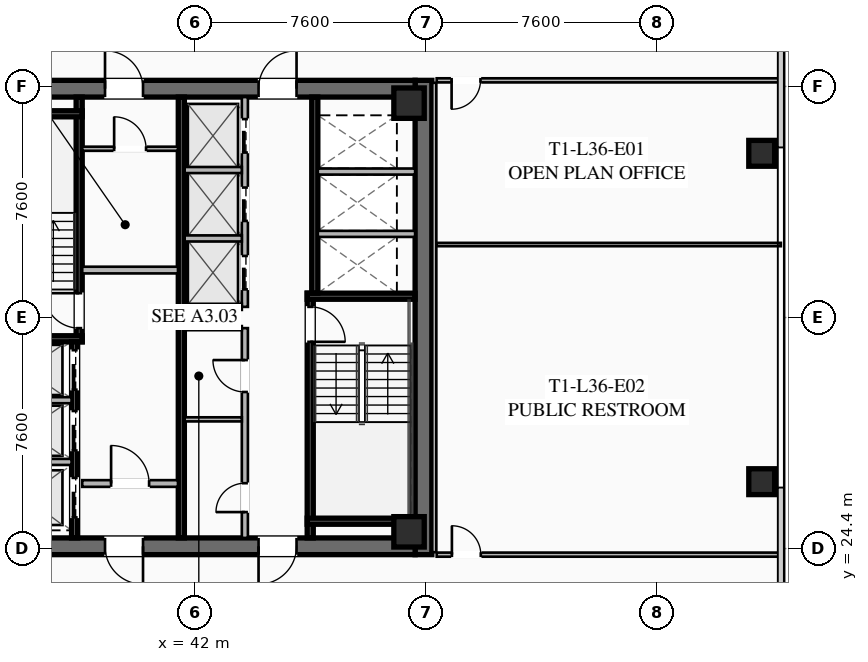
"""IFC4 building model, lengths in metres.
Left out: names, types, materials, properties, quantities, classifications, styles, units other than length and angle.
Written with IfcOpenShell. Run it as: python <this file> out.ifc"""

import sys

from ifc_helpers import new_model, si_unit, direction, frame, frame_2d, origin, origin_2d, place, context, subcontext, project, spatial, rectangle, hollow_rectangle, extrude, element, fill, save


model = new_model("IFC4")
c1 = context("Model", 3, precision=1e-05, world=origin(), true_north=direction((0.0, 1.0)))
c2 = subcontext(c1, "Body", "Model", "MODEL_VIEW")
j1 = project(units=[si_unit("LENGTHUNIT", "METRE"), si_unit("PLANEANGLEUNIT", "RADIAN")], contexts=[c1])
p1 = place(None, origin())
s1 = spatial("IfcSite", under=j1, at=p1, CompositionType="ELEMENT")
p2 = place(p1, origin())
s2 = spatial("IfcBuilding", under=s1, at=p2, CompositionType="ELEMENT")
p3 = place(p2, frame((0.0, 0.0, 135.7)))
s3 = spatial("IfcBuildingStorey", under=s2, at=p3, CompositionType="ELEMENT", Elevation=135.7)
p4 = place(p3, frame((49.525, 39.8, 0.0), z_axis=(0.0, 0.0, 1.0), x_axis=(0.0, -1.0, 0.0)))
e1 = element("IfcWall", 1, at=p4, inside=s3, PredefinedType="SHEAR", context=c2, shape_type="SweptSolid", body=[
    extrude(rectangle(XDim=15.6, YDim=0.55, at=frame_2d((7.8, 0.0))), origin(), (0.0, 0.0, 1.0), 3.55),
])
p5 = place(p3, frame((49.25, 24.475, 0.0), z_axis=(0.0, 0.0, 1.0), x_axis=(-1.0, 0.0, 0.0)))
e2 = element("IfcWall", 2, at=p5, inside=s3, PredefinedType="SHEAR", context=c2, shape_type="SweptSolid", body=[
    extrude(rectangle(XDim=14.5, YDim=0.55, at=frame_2d((7.25, 0.0))), origin(), (0.0, 0.0, 1.0), 3.55),
])
p6 = place(p5, frame((8.95, 0.0, 0.0)))
e3 = element("IfcOpeningElement", 3, at=p6, cuts=e2, PredefinedType="OPENING", context=c2, shape_type="SweptSolid", body=[
    extrude(rectangle(XDim=1.25, YDim=2.25, at=frame_2d((0.625, 1.125))), frame((0.0, 0.285, 0.0), z_axis=(0.0, -1.0, 0.0), x_axis=(1.0, 0.0, 0.0)), (0.0, 0.0, 1.0), 0.57),
])
p7 = place(p5, frame((3.9, 0.0, 0.0)))
e4 = element("IfcOpeningElement", 4, at=p7, cuts=e2, PredefinedType="OPENING", context=c2, shape_type="SweptSolid", body=[
    extrude(rectangle(XDim=1.25, YDim=2.25, at=frame_2d((0.625, 1.125))), frame((0.0, 0.285, 0.0), z_axis=(0.0, -1.0, 0.0), x_axis=(1.0, 0.0, 0.0)), (0.0, 0.0, 1.0), 0.57),
])
p8 = place(p3, frame((34.75, 39.525, 0.0), z_axis=(0.0, 0.0, 1.0), x_axis=(1.0, 0.0, 0.0)))
e5 = element("IfcWall", 5, at=p8, inside=s3, PredefinedType="SHEAR", context=c2, shape_type="SweptSolid", body=[
    extrude(rectangle(XDim=14.5, YDim=0.55, at=frame_2d((7.25, 0.0))), origin(), (0.0, 0.0, 1.0), 3.55),
])
p9 = place(p8, frame((4.3, 0.0, 0.0)))
e6 = element("IfcOpeningElement", 6, at=p9, cuts=e5, PredefinedType="OPENING", context=c2, shape_type="SweptSolid", body=[
    extrude(rectangle(XDim=1.25, YDim=2.25, at=frame_2d((0.625, 1.125))), frame((0.0, 0.285, 0.0), z_axis=(0.0, -1.0, 0.0), x_axis=(1.0, 0.0, 0.0)), (0.0, 0.0, 1.0), 0.57),
])
p10 = place(p8, frame((9.35, 0.0, 0.0)))
e7 = element("IfcOpeningElement", 7, at=p10, cuts=e5, PredefinedType="OPENING", context=c2, shape_type="SweptSolid", body=[
    extrude(rectangle(XDim=1.25, YDim=2.25, at=frame_2d((0.625, 1.125))), frame((0.0, 0.285, 0.0), z_axis=(0.0, -1.0, 0.0), x_axis=(1.0, 0.0, 0.0)), (0.0, 0.0, 1.0), 0.57),
])
for number, where, z_axis, x_axis in (
    (8, (49.05, 24.95, 0.0), (0.0, 0.0, 1.0), (1.0, 0.0, 0.0)),
    (9, (49.05, 39.05, 0.0), (0.0, 0.0, 1.0), (1.0, 0.0, 0.0)),
):
    element("IfcColumn", number, at=place(p3, frame(where, z_axis=z_axis, x_axis=x_axis)), inside=s3, PredefinedType="COLUMN", context=c2, shape_type="SweptSolid", body=[
        extrude(hollow_rectangle(XDim=1.0, YDim=1.0, WallThickness=0.04, at=origin_2d()), origin(), (0.0, 0.0, 1.0), 3.37),
    ])
for number, where, z_axis, x_axis in (
    (10, (60.65, 26.6, 0.0), (0.0, 0.0, 1.0), (1.0, 0.0, 0.0)),
    (11, (60.65, 37.4, 0.0), (0.0, 0.0, 1.0), (1.0, 0.0, 0.0)),
):
    element("IfcColumn", number, at=place(p3, frame(where, z_axis=z_axis, x_axis=x_axis)), inside=s3, PredefinedType="COLUMN", context=c2, shape_type="SweptSolid", body=[
        extrude(hollow_rectangle(XDim=0.85, YDim=0.85, WallThickness=0.035, at=origin_2d()), origin(), (0.0, 0.0, 1.0), 3.37),
    ])
p11 = place(p3, frame((38.2, 31.2, 0.0), z_axis=(0.0, 0.0, 1.0), x_axis=(0.0, 1.0, 0.0)))
e12 = element("IfcWall", 12, at=p11, inside=s3, PredefinedType="SHEAR", context=c2, shape_type="SweptSolid", body=[
    extrude(rectangle(XDim=8.05, YDim=0.2, at=frame_2d((4.025, 0.0))), origin(), (0.0, 0.0, 1.0), 3.37),
])
p12 = place(p11, frame((0.45, 0.0, 0.0)))
e13 = element("IfcOpeningElement", 13, at=p12, cuts=e12, PredefinedType="OPENING", context=c2, shape_type="SweptSolid", body=[
    extrude(rectangle(XDim=1.15, YDim=2.2, at=frame_2d((0.575, 1.1))), frame((0.0, 0.11, 0.0), z_axis=(0.0, -1.0, 0.0), x_axis=(1.0, 0.0, 0.0)), (0.0, 0.0, 1.0), 0.22),
])
for number, where, z_axis, x_axis in (
    (14, (34.75, 31.3, 0.0), (0.0, 0.0, 1.0), (1.0, 0.0, 0.0)),
    (15, (34.75, 38.7, 0.0), (0.0, 0.0, 1.0), (1.0, 0.0, 0.0)),
):
    element("IfcWall", number, at=place(p3, frame(where, z_axis=z_axis, x_axis=x_axis)), inside=s3, PredefinedType="SHEAR", context=c2, shape_type="SweptSolid", body=[
        extrude(rectangle(XDim=3.55, YDim=0.2, at=frame_2d((1.775, 0.0))), origin(), (0.0, 0.0, 1.0), 3.37),
    ])
p13 = place(p3, frame((45.8, 32.8, 0.0), z_axis=(0.0, 0.0, 1.0), x_axis=(0.0, -1.0, 0.0)))
e16 = element("IfcWall", 16, at=p13, inside=s3, PredefinedType="SHEAR", context=c2, shape_type="SweptSolid", body=[
    extrude(rectangle(XDim=8.05, YDim=0.2, at=frame_2d((4.025, 0.0))), origin(), (0.0, 0.0, 1.0), 3.37),
])
p14 = place(p13, frame((0.45, 0.0, 0.0)))
e17 = element("IfcOpeningElement", 17, at=p14, cuts=e16, PredefinedType="OPENING", context=c2, shape_type="SweptSolid", body=[
    extrude(rectangle(XDim=1.15, YDim=2.2, at=frame_2d((0.575, 1.1))), frame((0.0, 0.11, 0.0), z_axis=(0.0, -1.0, 0.0), x_axis=(1.0, 0.0, 0.0)), (0.0, 0.0, 1.0), 0.22),
])
for number, where, z_axis, x_axis in (
    (18, (45.7, 32.7, 0.0), (0.0, 0.0, 1.0), (1.0, 0.0, 0.0)),
    (19, (45.7, 25.3, 0.0), (0.0, 0.0, 1.0), (1.0, 0.0, 0.0)),
):
    element("IfcWall", number, at=place(p3, frame(where, z_axis=z_axis, x_axis=x_axis)), inside=s3, PredefinedType="SHEAR", context=c2, shape_type="SweptSolid", body=[
        extrude(rectangle(XDim=3.55, YDim=0.2, at=frame_2d((1.775, 0.0))), origin(), (0.0, 0.0, 1.0), 3.37),
    ])
p15 = place(p3, frame((41.56, 24.75, 0.0), z_axis=(0.0, 0.0, 1.0), x_axis=(0.0, 1.0, 0.0)))
e20 = element("IfcWall", 20, at=p15, inside=s3, PredefinedType="SHEAR", context=c2, shape_type="SweptSolid", body=[
    extrude(rectangle(XDim=14.5, YDim=0.2, at=frame_2d((7.25, 0.0))), origin(), (0.0, 0.0, 1.0), 3.37),
])
p16 = place(p3, frame((38.3, 33.56, 0.0), z_axis=(0.0, 0.0, 1.0), x_axis=(1.0, 0.0, 0.0)))
e21 = element("IfcWall", 21, at=p16, inside=s3, PredefinedType="SOLIDWALL", context=c2, shape_type="SweptSolid", body=[
    extrude(rectangle(XDim=3.15, YDim=0.22, at=frame_2d((1.575, 0.0))), origin(), (0.0, 0.0, 1.0), 2.723),
])
p17 = place(p3, frame((38.3, 26.54, 0.0), z_axis=(0.0, 0.0, 1.0), x_axis=(1.0, 0.0, 0.0)))
e22 = element("IfcWall", 22, at=p17, inside=s3, PredefinedType="SOLIDWALL", context=c2, shape_type="SweptSolid", body=[
    extrude(rectangle(XDim=3.15, YDim=0.22, at=frame_2d((1.575, 0.0))), origin(), (0.0, 0.0, 1.0), 2.723),
])
p18 = place(p17, frame((0.95, 0.0, 0.0)))
e23 = element("IfcOpeningElement", 23, at=p18, cuts=e22, PredefinedType="OPENING", context=c2, shape_type="SweptSolid", body=[
    extrude(rectangle(XDim=1.25, YDim=2.25, at=frame_2d((0.625, 1.125))), frame((0.0, 0.12, 0.0), z_axis=(0.0, -1.0, 0.0), x_axis=(1.0, 0.0, 0.0)), (0.0, 0.0, 1.0), 0.24),
])
p19 = place(p3, frame((38.05, 24.75, 0.0), z_axis=(0.0, 0.0, 1.0), x_axis=(0.0, 1.0, 0.0)))
e24 = element("IfcWall", 24, at=p19, inside=s3, PredefinedType="SHEAR", context=c2, shape_type="SweptSolid", body=[
    extrude(rectangle(XDim=6.45, YDim=0.2, at=frame_2d((3.225, 0.0))), origin(), (0.0, 0.0, 1.0), 3.37),
])
p20 = place(p19, frame((4.875, 0.0, 0.0)))
e25 = element("IfcOpeningElement", 25, at=p20, cuts=e24, PredefinedType="OPENING", context=c2, shape_type="SweptSolid", body=[
    extrude(rectangle(XDim=1.3, YDim=2.25, at=frame_2d((0.65, 1.125))), frame((0.0, 0.11, 0.0), z_axis=(0.0, -1.0, 0.0), x_axis=(1.0, 0.0, 0.0)), (0.0, 0.0, 1.0), 0.22),
])
p21 = place(p19, frame((2.875, 0.0, 0.0)))
e26 = element("IfcOpeningElement", 26, at=p21, cuts=e24, PredefinedType="OPENING", context=c2, shape_type="SweptSolid", body=[
    extrude(rectangle(XDim=1.3, YDim=2.25, at=frame_2d((0.65, 1.125))), frame((0.0, 0.11, 0.0), z_axis=(0.0, -1.0, 0.0), x_axis=(1.0, 0.0, 0.0)), (0.0, 0.0, 1.0), 0.22),
])
p22 = place(p19, frame((0.675, 0.0, 0.0)))
e27 = element("IfcOpeningElement", 27, at=p22, cuts=e24, PredefinedType="OPENING", context=c2, shape_type="SweptSolid", body=[
    extrude(rectangle(XDim=1.3, YDim=2.25, at=frame_2d((0.65, 1.125))), frame((0.0, 0.11, 0.0), z_axis=(0.0, -1.0, 0.0), x_axis=(1.0, 0.0, 0.0)), (0.0, 0.0, 1.0), 0.22),
])
for number, where, z_axis, x_axis in (
    (28, (34.75, 27.25, 0.0), (0.0, 0.0, 1.0), (1.0, 0.0, 0.0)),
    (29, (34.75, 29.28, 0.0), (0.0, 0.0, 1.0), (1.0, 0.0, 0.0)),
):
    element("IfcWall", number, at=place(p3, frame(where, z_axis=z_axis, x_axis=x_axis)), inside=s3, PredefinedType="SOLIDWALL", context=c2, shape_type="SweptSolid", body=[
        extrude(rectangle(XDim=3.2, YDim=0.2, at=frame_2d((1.6, 0.0))), origin(), (0.0, 0.0, 1.0), 3.37),
    ])
p23 = place(p3, frame((45.95, 39.25, 0.0), z_axis=(0.0, 0.0, 1.0), x_axis=(0.0, -1.0, 0.0)))
e30 = element("IfcWall", 30, at=p23, inside=s3, PredefinedType="SHEAR", context=c2, shape_type="SweptSolid", body=[
    extrude(rectangle(XDim=6.45, YDim=0.2, at=frame_2d((3.225, 0.0))), origin(), (0.0, 0.0, 1.0), 3.37),
])
for number, where, z_axis, x_axis in (
    (31, (46.05, 34.75, 0.0), (0.0, 0.0, 1.0), (1.0, 0.0, 0.0)),
    (32, (46.05, 36.8, 0.0), (0.0, 0.0, 1.0), (1.0, 0.0, 0.0)),
):
    element("IfcWall", number, at=place(p3, frame(where, z_axis=z_axis, x_axis=x_axis)), inside=s3, PredefinedType="SOLIDWALL", context=c2, shape_type="SweptSolid", body=[
        extrude(rectangle(XDim=3.2, YDim=0.2, at=frame_2d((1.6, 0.0))), origin(), (0.0, 0.0, 1.0), 3.37),
    ])
p24 = place(p3, frame((38.3, 37.55, 0.0), z_axis=(0.0, 0.0, 1.0), x_axis=(1.0, 0.0, 0.0)))
e33 = element("IfcWall", 33, at=p24, inside=s3, PredefinedType="PARTITIONING", context=c2, shape_type="SweptSolid", body=[
    extrude(rectangle(XDim=3.15, YDim=0.135, at=frame_2d((1.575, 0.0))), origin(), (0.0, 0.0, 1.0), 2.723),
])
p25 = place(p24, frame((1.05, 0.0, 0.0)))
e34 = element("IfcOpeningElement", 34, at=p25, cuts=e33, PredefinedType="OPENING", context=c2, shape_type="SweptSolid", body=[
    extrude(rectangle(XDim=1.05, YDim=2.2, at=frame_2d((0.525, 1.1))), frame((0.0, 0.077, 0.0), z_axis=(0.0, -1.0, 0.0), x_axis=(1.0, 0.0, 0.0)), (0.0, 0.0, 1.0), 0.155),
])
p26 = place(p3, frame((43.65, 24.75, 0.0), z_axis=(0.0, 0.0, 1.0), x_axis=(0.0, 1.0, 0.0)))
e35 = element("IfcWall", 35, at=p26, inside=s3, PredefinedType="SOLIDWALL", context=c2, shape_type="SweptSolid", body=[
    extrude(rectangle(XDim=6.9, YDim=0.2, at=frame_2d((3.45, 0.0))), origin(), (0.0, 0.0, 1.0), 2.723),
])
p27 = place(p26, frame((0.85, 0.0, 0.0)))
e36 = element("IfcOpeningElement", 36, at=p27, cuts=e35, PredefinedType="OPENING", context=c2, shape_type="SweptSolid", body=[
    extrude(rectangle(XDim=0.95, YDim=2.05, at=frame_2d((0.475, 1.025))), frame((0.0, 0.11, 0.0), z_axis=(0.0, -1.0, 0.0), x_axis=(1.0, 0.0, 0.0)), (0.0, 0.0, 1.0), 0.22),
])
p28 = place(p26, frame((4.8, 0.0, 0.0)))
e37 = element("IfcOpeningElement", 37, at=p28, cuts=e35, PredefinedType="OPENING", context=c2, shape_type="SweptSolid", body=[
    extrude(rectangle(XDim=1.05, YDim=2.2, at=frame_2d((0.525, 1.1))), frame((0.0, 0.11, 0.0), z_axis=(0.0, -1.0, 0.0), x_axis=(1.0, 0.0, 0.0)), (0.0, 0.0, 1.0), 0.22),
])
for number, where, z_axis, x_axis in (
    (38, (41.67, 31.65, 0.0), (0.0, 0.0, 1.0), (1.0, 0.0, 0.0)),
    (39, (41.67, 28.65, 0.0), (0.0, 0.0, 1.0), (1.0, 0.0, 0.0)),
):
    element("IfcWall", number, at=place(p3, frame(where, z_axis=z_axis, x_axis=x_axis)), inside=s3, PredefinedType="PARTITIONING", context=c2, shape_type="SweptSolid", body=[
        extrude(rectangle(XDim=1.88, YDim=0.135, at=frame_2d((0.94, 0.0))), origin(), (0.0, 0.0, 1.0), 2.723),
    ])
p29 = place(p3, frame((43.65, 32.35, 0.0), z_axis=(0.0, 0.0, 1.0), x_axis=(0.0, 1.0, 0.0)))
e40 = element("IfcWall", 40, at=p29, inside=s3, PredefinedType="SOLIDWALL", context=c2, shape_type="SweptSolid", body=[
    extrude(rectangle(XDim=6.9, YDim=0.2, at=frame_2d((3.45, 0.0))), origin(), (0.0, 0.0, 1.0), 3.37),
])
p30 = place(p29, frame((0.575, 0.0, 0.0)))
e41 = element("IfcOpeningElement", 41, at=p30, cuts=e40, PredefinedType="OPENING", context=c2, shape_type="SweptSolid", body=[
    extrude(rectangle(XDim=1.1, YDim=2.2, at=frame_2d((0.55, 1.1))), frame((0.0, 0.11, 0.0), z_axis=(0.0, -1.0, 0.0), x_axis=(1.0, 0.0, 0.0)), (0.0, 0.0, 1.0), 0.22),
])
p31 = place(p29, frame((2.825, 0.0, 0.0)))
e42 = element("IfcOpeningElement", 42, at=p31, cuts=e40, PredefinedType="OPENING", context=c2, shape_type="SweptSolid", body=[
    extrude(rectangle(XDim=1.1, YDim=2.2, at=frame_2d((0.55, 1.1))), frame((0.0, 0.11, 0.0), z_axis=(0.0, -1.0, 0.0), x_axis=(1.0, 0.0, 0.0)), (0.0, 0.0, 1.0), 0.22),
])
p32 = place(p29, frame((5.075, 0.0, 0.0)))
e43 = element("IfcOpeningElement", 43, at=p32, cuts=e40, PredefinedType="OPENING", context=c2, shape_type="SweptSolid", body=[
    extrude(rectangle(XDim=1.1, YDim=2.2, at=frame_2d((0.55, 1.1))), frame((0.0, 0.11, 0.0), z_axis=(0.0, -1.0, 0.0), x_axis=(1.0, 0.0, 0.0)), (0.0, 0.0, 1.0), 0.22),
])
for number, where, z_axis, x_axis in (
    (44, (41.67, 32.35, 0.0), (0.0, 0.0, 1.0), (1.0, 0.0, 0.0)),
    (45, (41.67, 34.6, 0.0), (0.0, 0.0, 1.0), (1.0, 0.0, 0.0)),
    (46, (41.67, 36.85, 0.0), (0.0, 0.0, 1.0), (1.0, 0.0, 0.0)),
):
    element("IfcWall", number, at=place(p3, frame(where, z_axis=z_axis, x_axis=x_axis)), inside=s3, PredefinedType="SOLIDWALL", context=c2, shape_type="SweptSolid", body=[
        extrude(rectangle(XDim=1.88, YDim=0.2, at=frame_2d((0.94, 0.0))), origin(), (0.0, 0.0, 1.0), 3.37),
    ])
p33 = place(p3, frame((49.88, 39.72, 0.0), z_axis=(0.0, 0.0, 1.0), x_axis=(0.0, -1.0, 0.0)))
e47 = element("IfcWall", 47, at=p33, inside=s3, PredefinedType="PARTITIONING", context=c2, shape_type="SweptSolid", body=[
    extrude(rectangle(XDim=15.44, YDim=0.135, at=frame_2d((7.72, 0.0))), origin(), (0.0, 0.0, 1.0), 2.723),
])
p34 = place(p3, frame((61.28, 39.8, 0.0), z_axis=(0.0, 0.0, 1.0), x_axis=(-1.0, 0.0, 0.0)))
e48 = element("IfcWall", 48, at=p34, inside=s3, PredefinedType="PARTITIONING", context=c2, shape_type="SweptSolid", body=[
    extrude(rectangle(XDim=11.32, YDim=0.135, at=frame_2d((5.66, 0.0))), origin(), (0.0, 0.0, 1.0), 2.723),
])
p35 = place(p34, frame((9.88, 0.0, 0.0)))
e49 = element("IfcOpeningElement", 49, at=p35, cuts=e48, PredefinedType="OPENING", context=c2, shape_type="SweptSolid", body=[
    extrude(rectangle(XDim=0.95, YDim=2.05, at=frame_2d((0.475, 1.025))), frame((0.0, 0.077, 0.0), z_axis=(0.0, -1.0, 0.0), x_axis=(1.0, 0.0, 0.0)), (0.0, 0.0, 1.0), 0.155),
])
p36 = place(p3, frame((49.96, 24.2, 0.0), z_axis=(0.0, 0.0, 1.0), x_axis=(1.0, 0.0, 0.0)))
e50 = element("IfcWall", 50, at=p36, inside=s3, PredefinedType="PARTITIONING", context=c2, shape_type="SweptSolid", body=[
    extrude(rectangle(XDim=11.32, YDim=0.135, at=frame_2d((5.66, 0.0))), origin(), (0.0, 0.0, 1.0), 2.723),
])
p37 = place(p36, frame((0.5, 0.0, 0.0)))
e51 = element("IfcOpeningElement", 51, at=p37, cuts=e50, PredefinedType="OPENING", context=c2, shape_type="SweptSolid", body=[
    extrude(rectangle(XDim=0.95, YDim=2.05, at=frame_2d((0.475, 1.025))), frame((0.0, 0.077, 0.0), z_axis=(0.0, -1.0, 0.0), x_axis=(1.0, 0.0, 0.0)), (0.0, 0.0, 1.0), 0.155),
])
p38 = place(p3, frame((49.96, 34.4, 0.0), z_axis=(0.0, 0.0, 1.0), x_axis=(1.0, 0.0, 0.0)))
e52 = element("IfcWall", 52, at=p38, inside=s3, PredefinedType="PARTITIONING", context=c2, shape_type="SweptSolid", body=[
    extrude(rectangle(XDim=11.32, YDim=0.11, at=frame_2d((5.66, 0.0))), origin(), (0.0, 0.0, 1.0), 2.723),
])
p39 = place(p9, origin())
e53 = element("IfcDoor", 53, at=p39, inside=s3, OperationType="SINGLE_SWING_LEFT", PredefinedType="DOOR", context=c2, shape_type="SweptSolid", body=[
    extrude(rectangle(XDim=1.25, YDim=2.25, at=frame_2d((0.625, 1.125))), frame((0.0, 0.025, 0.0), z_axis=(0.0, -1.0, 0.0), x_axis=(1.0, 0.0, 0.0)), (0.0, 0.0, 1.0), 0.05),
])
fill(e6, e53)
p40 = place(p10, origin())
e54 = element("IfcDoor", 54, at=p40, inside=s3, OperationType="SINGLE_SWING_RIGHT", PredefinedType="DOOR", context=c2, shape_type="SweptSolid", body=[
    extrude(rectangle(XDim=1.25, YDim=2.25, at=frame_2d((0.625, 1.125))), frame((0.0, 0.025, 0.0), z_axis=(0.0, -1.0, 0.0), x_axis=(1.0, 0.0, 0.0)), (0.0, 0.0, 1.0), 0.05),
])
fill(e7, e54)
p41 = place(p6, origin())
e55 = element("IfcDoor", 55, at=p41, inside=s3, OperationType="SINGLE_SWING_LEFT", PredefinedType="DOOR", context=c2, shape_type="SweptSolid", body=[
    extrude(rectangle(XDim=1.25, YDim=2.25, at=frame_2d((0.625, 1.125))), frame((0.0, 0.025, 0.0), z_axis=(0.0, -1.0, 0.0), x_axis=(1.0, 0.0, 0.0)), (0.0, 0.0, 1.0), 0.05),
])
fill(e3, e55)
p42 = place(p7, origin())
e56 = element("IfcDoor", 56, at=p42, inside=s3, OperationType="SINGLE_SWING_RIGHT", PredefinedType="DOOR", context=c2, shape_type="SweptSolid", body=[
    extrude(rectangle(XDim=1.25, YDim=2.25, at=frame_2d((0.625, 1.125))), frame((0.0, 0.025, 0.0), z_axis=(0.0, -1.0, 0.0), x_axis=(1.0, 0.0, 0.0)), (0.0, 0.0, 1.0), 0.05),
])
fill(e4, e56)
p43 = place(p12, origin())
e57 = element("IfcDoor", 57, at=p43, inside=s3, OperationType="SINGLE_SWING_RIGHT", PredefinedType="DOOR", context=c2, shape_type="SweptSolid", body=[
    extrude(rectangle(XDim=1.15, YDim=2.2, at=frame_2d((0.575, 1.1))), frame((0.0, 0.025, 0.0), z_axis=(0.0, -1.0, 0.0), x_axis=(1.0, 0.0, 0.0)), (0.0, 0.0, 1.0), 0.05),
])
fill(e13, e57)
p44 = place(p14, origin())
e58 = element("IfcDoor", 58, at=p44, inside=s3, OperationType="SINGLE_SWING_RIGHT", PredefinedType="DOOR", context=c2, shape_type="SweptSolid", body=[
    extrude(rectangle(XDim=1.15, YDim=2.2, at=frame_2d((0.575, 1.1))), frame((0.0, 0.025, 0.0), z_axis=(0.0, -1.0, 0.0), x_axis=(1.0, 0.0, 0.0)), (0.0, 0.0, 1.0), 0.05),
])
fill(e17, e58)
p45 = place(p18, origin())
e59 = element("IfcDoor", 59, at=p45, inside=s3, OperationType="SINGLE_SWING_LEFT", PredefinedType="DOOR", context=c2, shape_type="SweptSolid", body=[
    extrude(rectangle(XDim=1.25, YDim=2.25, at=frame_2d((0.625, 1.125))), frame((0.0, 0.025, 0.0), z_axis=(0.0, -1.0, 0.0), x_axis=(1.0, 0.0, 0.0)), (0.0, 0.0, 1.0), 0.05),
])
fill(e23, e59)
p46 = place(p25, origin())
e60 = element("IfcDoor", 60, at=p46, inside=s3, OperationType="SINGLE_SWING_LEFT", PredefinedType="DOOR", context=c2, shape_type="SweptSolid", body=[
    extrude(rectangle(XDim=1.05, YDim=2.2, at=frame_2d((0.525, 1.1))), frame((0.0, 0.025, 0.0), z_axis=(0.0, -1.0, 0.0), x_axis=(1.0, 0.0, 0.0)), (0.0, 0.0, 1.0), 0.05),
])
fill(e34, e60)
p47 = place(p27, origin())
e61 = element("IfcDoor", 61, at=p47, inside=s3, OperationType="SINGLE_SWING_LEFT", PredefinedType="DOOR", context=c2, shape_type="SweptSolid", body=[
    extrude(rectangle(XDim=0.95, YDim=2.05, at=frame_2d((0.475, 1.025))), frame((0.0, 0.025, 0.0), z_axis=(0.0, -1.0, 0.0), x_axis=(1.0, 0.0, 0.0)), (0.0, 0.0, 1.0), 0.05),
])
fill(e36, e61)
p48 = place(p28, origin())
e62 = element("IfcDoor", 62, at=p48, inside=s3, OperationType="SINGLE_SWING_RIGHT", PredefinedType="DOOR", context=c2, shape_type="SweptSolid", body=[
    extrude(rectangle(XDim=1.05, YDim=2.2, at=frame_2d((0.525, 1.1))), frame((0.0, 0.025, 0.0), z_axis=(0.0, -1.0, 0.0), x_axis=(1.0, 0.0, 0.0)), (0.0, 0.0, 1.0), 0.05),
])
fill(e37, e62)
p49 = place(p35, origin())
e63 = element("IfcDoor", 63, at=p49, inside=s3, OperationType="SINGLE_SWING_RIGHT", PredefinedType="DOOR", context=c2, shape_type="SweptSolid", body=[
    extrude(rectangle(XDim=0.95, YDim=2.05, at=frame_2d((0.475, 1.025))), frame((0.0, 0.025, 0.0), z_axis=(0.0, -1.0, 0.0), x_axis=(1.0, 0.0, 0.0)), (0.0, 0.0, 1.0), 0.05),
])
fill(e49, e63)
p50 = place(p37, origin())
e64 = element("IfcDoor", 64, at=p50, inside=s3, OperationType="SINGLE_SWING_LEFT", PredefinedType="DOOR", context=c2, shape_type="SweptSolid", body=[
    extrude(rectangle(XDim=0.95, YDim=2.05, at=frame_2d((0.475, 1.025))), frame((0.0, 0.025, 0.0), z_axis=(0.0, -1.0, 0.0), x_axis=(1.0, 0.0, 0.0)), (0.0, 0.0, 1.0), 0.05),
])
fill(e51, e64)
p51 = place(p20, origin())
e65 = element("IfcDoor", 65, at=p51, inside=s3, OperationType="SLIDING_TO_LEFT", PredefinedType="DOOR", context=c2, shape_type="SweptSolid", body=[
    extrude(rectangle(XDim=1.3, YDim=2.25, at=frame_2d((0.65, 1.125))), frame((0.0, 0.025, 0.0), z_axis=(0.0, -1.0, 0.0), x_axis=(1.0, 0.0, 0.0)), (0.0, 0.0, 1.0), 0.05),
])
fill(e25, e65)
p52 = place(p21, origin())
e66 = element("IfcDoor", 66, at=p52, inside=s3, OperationType="SLIDING_TO_LEFT", PredefinedType="DOOR", context=c2, shape_type="SweptSolid", body=[
    extrude(rectangle(XDim=1.3, YDim=2.25, at=frame_2d((0.65, 1.125))), frame((0.0, 0.025, 0.0), z_axis=(0.0, -1.0, 0.0), x_axis=(1.0, 0.0, 0.0)), (0.0, 0.0, 1.0), 0.05),
])
fill(e26, e66)
p53 = place(p22, origin())
e67 = element("IfcDoor", 67, at=p53, inside=s3, OperationType="SLIDING_TO_LEFT", PredefinedType="DOOR", context=c2, shape_type="SweptSolid", body=[
    extrude(rectangle(XDim=1.3, YDim=2.25, at=frame_2d((0.65, 1.125))), frame((0.0, 0.025, 0.0), z_axis=(0.0, -1.0, 0.0), x_axis=(1.0, 0.0, 0.0)), (0.0, 0.0, 1.0), 0.05),
])
fill(e27, e67)
p54 = place(p30, origin())
e68 = element("IfcDoor", 68, at=p54, inside=s3, OperationType="SLIDING_TO_LEFT", PredefinedType="DOOR", context=c2, shape_type="SweptSolid", body=[
    extrude(rectangle(XDim=1.1, YDim=2.2, at=frame_2d((0.55, 1.1))), frame((0.0, 0.025, 0.0), z_axis=(0.0, -1.0, 0.0), x_axis=(1.0, 0.0, 0.0)), (0.0, 0.0, 1.0), 0.05),
])
fill(e41, e68)
p55 = place(p31, origin())
e69 = element("IfcDoor", 69, at=p55, inside=s3, OperationType="SLIDING_TO_LEFT", PredefinedType="DOOR", context=c2, shape_type="SweptSolid", body=[
    extrude(rectangle(XDim=1.1, YDim=2.2, at=frame_2d((0.55, 1.1))), frame((0.0, 0.025, 0.0), z_axis=(0.0, -1.0, 0.0), x_axis=(1.0, 0.0, 0.0)), (0.0, 0.0, 1.0), 0.05),
])
fill(e42, e69)
p56 = place(p32, origin())
e70 = element("IfcDoor", 70, at=p56, inside=s3, OperationType="SLIDING_TO_LEFT", PredefinedType="DOOR", context=c2, shape_type="SweptSolid", body=[
    extrude(rectangle(XDim=1.1, YDim=2.2, at=frame_2d((0.55, 1.1))), frame((0.0, 0.025, 0.0), z_axis=(0.0, -1.0, 0.0), x_axis=(1.0, 0.0, 0.0)), (0.0, 0.0, 1.0), 0.05),
])
fill(e43, e70)
save(model, sys.argv[1])
